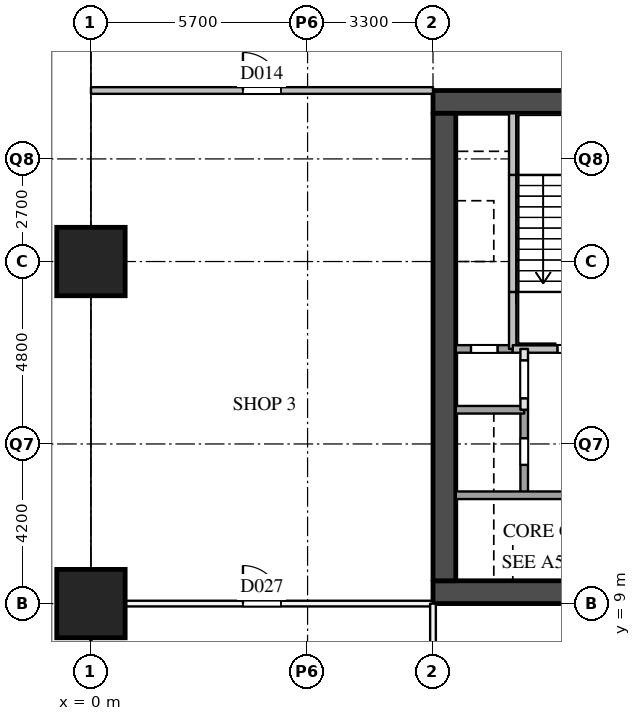
"""IFC4 building model, lengths in metres.
Left out: names, types, materials, properties, quantities, classifications, styles, units other than length and angle.
Written with IfcOpenShell. Run it as: python <this file> out.ifc"""

import sys

from ifc_helpers import new_model, si_unit, direction, frame, frame_2d, origin, origin_2d, place, context, subcontext, project, spatial, rectangle, extrude, element, fill, save


model = new_model("IFC4")
c1 = context("Model", 3, precision=1e-05, world=origin(), true_north=direction((0.0, 1.0)))
c2 = subcontext(c1, "Body", "Model", "MODEL_VIEW")
j1 = project(units=[si_unit("LENGTHUNIT", "METRE"), si_unit("PLANEANGLEUNIT", "RADIAN")], contexts=[c1])
p1 = place(None, origin())
s1 = spatial("IfcSite", under=j1, at=p1, CompositionType="ELEMENT")
p2 = place(p1, origin())
s2 = spatial("IfcBuilding", under=s1, at=p2, CompositionType="ELEMENT")
p3 = place(p2, origin())
s3 = spatial("IfcBuildingStorey", under=s2, at=p3, CompositionType="ELEMENT", Elevation=0.0)
for number, where, z_axis, x_axis in (
    (1, (0.0, 9.0, 0.0), (0.0, 0.0, 1.0), (1.0, 0.0, 0.0)),
    (2, (0.0, 18.0, 0.0), (0.0, 0.0, 1.0), (1.0, 0.0, 0.0)),
):
    element("IfcColumn", number, at=place(p3, frame(where, z_axis=z_axis, x_axis=x_axis)), inside=s3, PredefinedType="COLUMN", context=c2, shape_type="SweptSolid", body=[
        extrude(rectangle(XDim=1.8, YDim=1.8, at=origin_2d()), origin(), (0.0, 0.0, 1.0), 8.0),
    ])
for number, where, z_axis, x_axis in (
    (3, (9.0, 9.3, 0.0), (0.0, 0.0, 1.0), (1.0, 0.0, 0.0)),
    (4, (9.0, 22.2, 0.0), (0.0, 0.0, 1.0), (1.0, 0.0, 0.0)),
):
    element("IfcWall", number, at=place(p3, frame(where, z_axis=z_axis, x_axis=x_axis)), inside=s3, PredefinedType="SHEAR", context=c2, shape_type="SweptSolid", body=[
        extrude(rectangle(XDim=9.0, YDim=0.6, at=frame_2d((4.5, 0.0))), origin(), (0.0, 0.0, 1.0), 7.59),
    ])
p4 = place(p3, frame((9.3, 9.6, 0.0), z_axis=(0.0, 0.0, 1.0), x_axis=(0.0, 1.0, 0.0)))
e5 = element("IfcWall", 5, at=p4, inside=s3, PredefinedType="SHEAR", context=c2, shape_type="SweptSolid", body=[
    extrude(rectangle(XDim=12.3, YDim=0.6, at=frame_2d((6.15, 0.0))), origin(), (0.0, 0.0, 1.0), 7.59),
])
p5 = place(p3, frame((11.1, 15.7, 0.0), z_axis=(0.0, 0.0, 1.0), x_axis=(0.0, 1.0, 0.0)))
e6 = element("IfcWall", 6, at=p5, inside=s3, PredefinedType="SOLIDWALL", context=c2, shape_type="SweptSolid", body=[
    extrude(rectangle(XDim=1.5, YDim=0.2, at=frame_2d((0.75, 0.0))), origin(), (0.0, 0.0, 1.0), 7.59),
])
p6 = place(p3, frame((11.1, 17.2, 0.0), z_axis=(0.0, 0.0, 1.0), x_axis=(0.0, 1.0, 0.0)))
e7 = element("IfcWall", 7, at=p6, inside=s3, PredefinedType="SOLIDWALL", context=c2, shape_type="SweptSolid", body=[
    extrude(rectangle(XDim=3.08, YDim=0.2, at=frame_2d((1.54, 0.0))), origin(), (0.0, 0.0, 1.0), 7.59),
])
p7 = place(p3, frame((11.1, 20.28, 0.0), z_axis=(0.0, 0.0, 1.0), x_axis=(0.0, 1.0, 0.0)))
e8 = element("IfcWall", 8, at=p7, inside=s3, PredefinedType="SOLIDWALL", context=c2, shape_type="SweptSolid", body=[
    extrude(rectangle(XDim=1.62, YDim=0.2, at=frame_2d((0.81, 0.0))), origin(), (0.0, 0.0, 1.0), 7.59),
])
p8 = place(p3, frame((11.4, 14.1, 0.0), z_axis=(0.0, 0.0, 1.0), x_axis=(0.0, 1.0, 0.0)))
e9 = element("IfcWall", 9, at=p8, inside=s3, PredefinedType="PARTITIONING", context=c2, shape_type="SweptSolid", body=[
    extrude(rectangle(XDim=1.6, YDim=0.2, at=frame_2d((0.8, 0.0))), origin(), (0.0, 0.0, 1.0), 7.59),
])
p9 = place(p8, frame((0.3, 0.0, 0.0)))
e10 = element("IfcOpeningElement", 10, at=p9, cuts=e9, PredefinedType="OPENING", context=c2, shape_type="SweptSolid", body=[
    extrude(rectangle(XDim=1.0, YDim=2.1, at=frame_2d((0.5, 1.05))), frame((0.0, 0.11, 0.0), z_axis=(0.0, -1.0, 0.0), x_axis=(1.0, 0.0, 0.0)), (0.0, 0.0, 1.0), 0.22),
])
p10 = place(p3, frame((11.4, 11.9, 0.0), z_axis=(0.0, 0.0, 1.0), x_axis=(0.0, 1.0, 0.0)))
e11 = element("IfcWall", 11, at=p10, inside=s3, PredefinedType="SOLIDWALL", context=c2, shape_type="SweptSolid", body=[
    extrude(rectangle(XDim=2.2, YDim=0.2, at=frame_2d((1.1, 0.0))), origin(), (0.0, 0.0, 1.0), 7.59),
])
p11 = place(p10, frame((0.75, 0.0, 0.0)))
e12 = element("IfcOpeningElement", 12, at=p11, cuts=e11, PredefinedType="OPENING", context=c2, shape_type="SweptSolid", body=[
    extrude(rectangle(XDim=0.7, YDim=2.1, at=frame_2d((0.35, 1.05))), frame((0.0, 0.11, 0.0), z_axis=(0.0, -1.0, 0.0), x_axis=(1.0, 0.0, 0.0)), (0.0, 0.0, 1.0), 0.22),
])
p12 = place(p3, frame((9.6, 11.85, 0.0), z_axis=(0.0, 0.0, 1.0), x_axis=(1.0, 0.0, 0.0)))
e13 = element("IfcWall", 13, at=p12, inside=s3, PredefinedType="SOLIDWALL", context=c2, shape_type="SweptSolid", body=[
    extrude(rectangle(XDim=7.8, YDim=0.2, at=frame_2d((3.9, 0.0))), origin(), (0.0, 0.0, 1.0), 7.59),
])
p13 = place(p12, frame((2.85, 0.0, 0.0)))
e14 = element("IfcOpeningElement", 14, at=p13, cuts=e13, PredefinedType="OPENING", context=c2, shape_type="SweptSolid", body=[
    extrude(rectangle(XDim=0.7, YDim=2.1, at=frame_2d((0.35, 1.05))), frame((0.0, 0.11, 0.0), z_axis=(0.0, -1.0, 0.0), x_axis=(1.0, 0.0, 0.0)), (0.0, 0.0, 1.0), 0.22),
])
p14 = place(p3, frame((9.6, 14.1, 0.0), z_axis=(0.0, 0.0, 1.0), x_axis=(1.0, 0.0, 0.0)))
e15 = element("IfcWall", 15, at=p14, inside=s3, PredefinedType="SOLIDWALL", context=c2, shape_type="SweptSolid", body=[
    extrude(rectangle(XDim=1.8, YDim=0.2, at=frame_2d((0.9, 0.0))), origin(), (0.0, 0.0, 1.0), 7.59),
])
p15 = place(p3, frame((9.6, 15.7, 0.0), z_axis=(0.0, 0.0, 1.0), x_axis=(1.0, 0.0, 0.0)))
e16 = element("IfcWall", 16, at=p15, inside=s3, PredefinedType="SOLIDWALL", context=c2, shape_type="SweptSolid", body=[
    extrude(rectangle(XDim=1.5, YDim=0.2, at=frame_2d((0.75, 0.0))), origin(), (0.0, 0.0, 1.0), 7.59),
])
p16 = place(p15, frame((0.4, 0.0, 0.0)))
e17 = element("IfcOpeningElement", 17, at=p16, cuts=e16, PredefinedType="OPENING", context=c2, shape_type="SweptSolid", body=[
    extrude(rectangle(XDim=0.7, YDim=2.1, at=frame_2d((0.35, 1.05))), frame((0.0, 0.11, 0.0), z_axis=(0.0, -1.0, 0.0), x_axis=(1.0, 0.0, 0.0)), (0.0, 0.0, 1.0), 0.22),
])
p17 = place(p3, frame((11.1, 15.7, 0.0), z_axis=(0.0, 0.0, 1.0), x_axis=(1.0, 0.0, 0.0)))
e18 = element("IfcWall", 18, at=p17, inside=s3, PredefinedType="SOLIDWALL", context=c2, shape_type="SweptSolid", body=[
    extrude(rectangle(XDim=3.05, YDim=0.2, at=frame_2d((1.525, 0.0))), origin(), (0.0, 0.0, 1.0), 7.59),
])
p18 = place(p17, frame((1.175, 0.0, 0.0)))
e19 = element("IfcOpeningElement", 19, at=p18, cuts=e18, PredefinedType="OPENING", context=c2, shape_type="SweptSolid", body=[
    extrude(rectangle(XDim=1.1, YDim=2.1, at=frame_2d((0.55, 1.05))), frame((0.0, 0.11, 0.0), z_axis=(0.0, -1.0, 0.0), x_axis=(1.0, 0.0, 0.0)), (0.0, 0.0, 1.0), 0.22),
])
p19 = place(p3, frame((0.0, 22.5, 0.0), z_axis=(0.0, 0.0, 1.0), x_axis=(1.0, 0.0, 0.0)))
e20 = element("IfcWall", 20, at=p19, inside=s3, PredefinedType="PARTITIONING", context=c2, shape_type="SweptSolid", body=[
    extrude(rectangle(XDim=9.0, YDim=0.175, at=frame_2d((4.5, 0.0))), origin(), (0.0, 0.0, 1.0), 6.59),
])
p20 = place(p19, frame((4.0, 0.0, 0.0)))
e21 = element("IfcOpeningElement", 21, at=p20, cuts=e20, PredefinedType="OPENING", context=c2, shape_type="SweptSolid", body=[
    extrude(rectangle(XDim=1.0, YDim=2.1, at=frame_2d((0.5, 1.05))), frame((0.0, 0.097, 0.0), z_axis=(0.0, -1.0, 0.0), x_axis=(1.0, 0.0, 0.0)), (0.0, 0.0, 1.0), 0.195),
])
p21 = place(p3, frame((0.0, 9.0, 0.0), z_axis=(0.0, 0.0, 1.0), x_axis=(1.0, 0.0, 0.0)))
e22 = element("IfcWall", 22, at=p21, inside=s3, PredefinedType="PARTITIONING", context=c2, shape_type="SweptSolid", body=[
    extrude(rectangle(XDim=9.0, YDim=0.15, at=frame_2d((4.5, 0.0))), origin(), (0.0, 0.0, 1.0), 7.59),
])
p22 = place(p21, frame((4.0, 0.0, 0.0)))
e23 = element("IfcOpeningElement", 23, at=p22, cuts=e22, PredefinedType="OPENING", context=c2, shape_type="SweptSolid", body=[
    extrude(rectangle(XDim=1.0, YDim=2.1, at=frame_2d((0.5, 1.05))), frame((0.0, 0.085, 0.0), z_axis=(0.0, -1.0, 0.0), x_axis=(1.0, 0.0, 0.0)), (0.0, 0.0, 1.0), 0.17),
])
p23 = place(p3, frame((9.0, 0.0, 0.0), z_axis=(0.0, 0.0, 1.0), x_axis=(0.0, 1.0, 0.0)))
e24 = element("IfcWall", 24, at=p23, inside=s3, PredefinedType="PARTITIONING", context=c2, shape_type="SweptSolid", body=[
    extrude(rectangle(XDim=9.0, YDim=0.15, at=frame_2d((4.5, 0.0))), origin(), (0.0, 0.0, 1.0), 7.59),
])
p24 = place(p23, frame((4.0, 0.0, 0.0)))
e25 = element("IfcOpeningElement", 25, at=p24, cuts=e24, PredefinedType="OPENING", context=c2, shape_type="SweptSolid", body=[
    extrude(rectangle(XDim=1.0, YDim=2.1, at=frame_2d((0.5, 1.05))), frame((0.0, 0.085, 0.0), z_axis=(0.0, -1.0, 0.0), x_axis=(1.0, 0.0, 0.0)), (0.0, 0.0, 1.0), 0.17),
])
p25 = place(p18, origin())
e26 = element("IfcDoor", 26, at=p25, inside=s3, OperationType="SINGLE_SWING_RIGHT", PredefinedType="DOOR", context=c2, shape_type="SweptSolid", body=[
    extrude(rectangle(XDim=1.1, YDim=2.1, at=frame_2d((0.55, 1.05))), frame((0.0, 0.025, 0.0), z_axis=(0.0, -1.0, 0.0), x_axis=(1.0, 0.0, 0.0)), (0.0, 0.0, 1.0), 0.05),
])
fill(e19, e26)
p26 = place(p16, origin())
e27 = element("IfcDoor", 27, at=p26, inside=s3, OperationType="SINGLE_SWING_LEFT", PredefinedType="DOOR", context=c2, shape_type="SweptSolid", body=[
    extrude(rectangle(XDim=0.7, YDim=2.1, at=frame_2d((0.35, 1.05))), frame((0.0, 0.025, 0.0), z_axis=(0.0, -1.0, 0.0), x_axis=(1.0, 0.0, 0.0)), (0.0, 0.0, 1.0), 0.05),
])
fill(e17, e27)
p27 = place(p11, origin())
e28 = element("IfcDoor", 28, at=p27, inside=s3, OperationType="SINGLE_SWING_RIGHT", PredefinedType="DOOR", context=c2, shape_type="SweptSolid", body=[
    extrude(rectangle(XDim=0.7, YDim=2.1, at=frame_2d((0.35, 1.05))), frame((0.0, 0.025, 0.0), z_axis=(0.0, -1.0, 0.0), x_axis=(1.0, 0.0, 0.0)), (0.0, 0.0, 1.0), 0.05),
])
fill(e12, e28)
p28 = place(p9, origin())
e29 = element("IfcDoor", 29, at=p28, inside=s3, OperationType="SINGLE_SWING_RIGHT", PredefinedType="DOOR", context=c2, shape_type="SweptSolid", body=[
    extrude(rectangle(XDim=1.0, YDim=2.1, at=frame_2d((0.5, 1.05))), frame((0.0, 0.025, 0.0), z_axis=(0.0, -1.0, 0.0), x_axis=(1.0, 0.0, 0.0)), (0.0, 0.0, 1.0), 0.05),
])
fill(e10, e29)
p29 = place(p20, origin())
e30 = element("IfcDoor", 30, at=p29, inside=s3, OperationType="SINGLE_SWING_LEFT", PredefinedType="DOOR", context=c2, shape_type="SweptSolid", body=[
    extrude(rectangle(XDim=1.0, YDim=2.1, at=frame_2d((0.5, 1.05))), frame((0.0, 0.025, 0.0), z_axis=(0.0, -1.0, 0.0), x_axis=(1.0, 0.0, 0.0)), (0.0, 0.0, 1.0), 0.05),
])
fill(e21, e30)
p30 = place(p22, origin())
e31 = element("IfcDoor", 31, at=p30, inside=s3, OperationType="SINGLE_SWING_LEFT", PredefinedType="DOOR", context=c2, shape_type="SweptSolid", body=[
    extrude(rectangle(XDim=1.0, YDim=2.1, at=frame_2d((0.5, 1.05))), frame((0.0, 0.025, 0.0), z_axis=(0.0, -1.0, 0.0), x_axis=(1.0, 0.0, 0.0)), (0.0, 0.0, 1.0), 0.05),
])
fill(e23, e31)
save(model, sys.argv[1])
